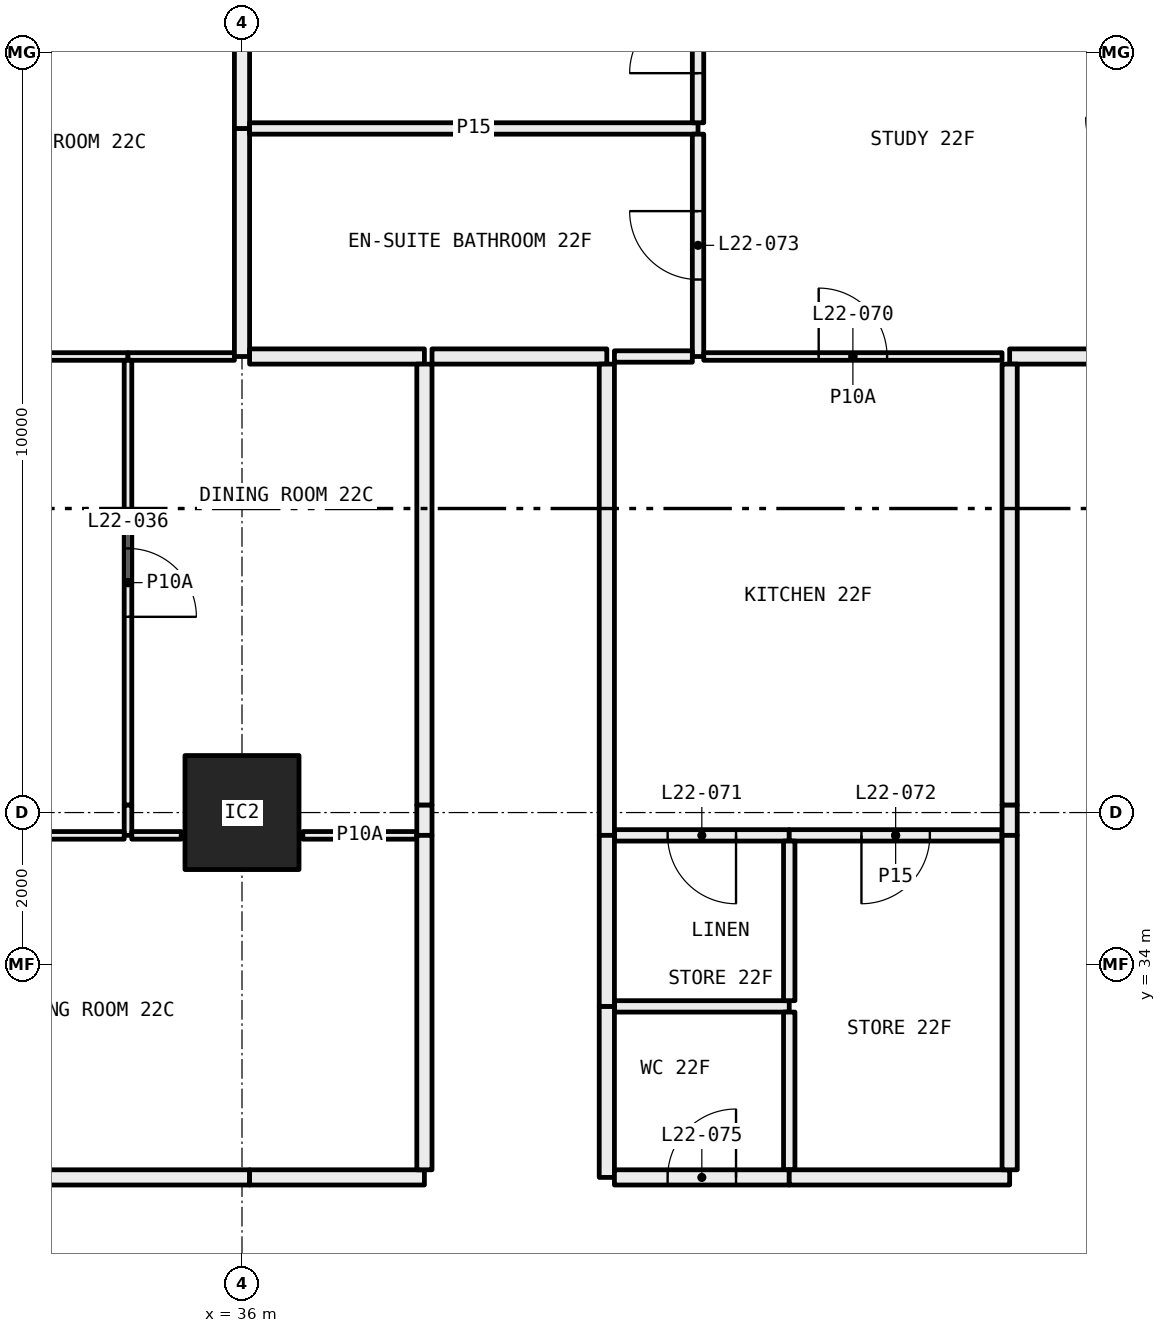
"""IFC4 building model, lengths in metres.
Left out: names, types, materials, properties, quantities, classifications, styles, units other than length and angle.
Written with IfcOpenShell. Run it as: python <this file> out.ifc"""

import sys

from ifc_helpers import new_model, si_unit, direction, frame, frame_2d, origin, origin_2d, place, context, subcontext, project, spatial, rectangle, hollow_rectangle, extrude, element, fill, save


model = new_model("IFC4")
c1 = context("Model", 3, precision=1e-05, world=origin(), true_north=direction((0.0, 1.0)))
c2 = subcontext(c1, "Body", "Model", "MODEL_VIEW")
j1 = project(units=[si_unit("LENGTHUNIT", "METRE"), si_unit("PLANEANGLEUNIT", "RADIAN")], contexts=[c1])
p1 = place(None, origin())
s1 = spatial("IfcSite", under=j1, at=p1, CompositionType="ELEMENT")
p2 = place(p1, origin())
s2 = spatial("IfcBuilding", under=s1, at=p2, CompositionType="ELEMENT")
p3 = place(p2, frame((0.0, 0.0, 88.65)))
s3 = spatial("IfcBuildingStorey", under=s2, at=p3, CompositionType="ELEMENT", Elevation=88.65)
p4 = place(p3, frame((36.0, 36.0, 0.0), z_axis=(0.0, 0.0, 1.0), x_axis=(1.0, 0.0, 0.0)))
e1 = element("IfcColumn", 1, at=p4, inside=s3, PredefinedType="COLUMN", context=c2, shape_type="SweptSolid", body=[
    extrude(hollow_rectangle(XDim=1.5, YDim=1.5, WallThickness=0.065, at=origin_2d()), origin(), (0.0, 0.0, 1.0), 3.05),
])
p5 = place(p3, frame((30.075, 42.0, 0.0), z_axis=(0.0, 0.0, 1.0), x_axis=(1.0, 0.0, 0.0)))
e2 = element("IfcWall", 2, at=p5, inside=s3, PredefinedType="PARTITIONING", context=c2, shape_type="SweptSolid", body=[
    extrude(rectangle(XDim=4.425, YDim=0.1, at=frame_2d((2.212, 0.0))), origin(), (0.0, 0.0, 1.0), 3.05),
])
p6 = place(p5, frame((1.762, 0.0, 0.0)))
e3 = element("IfcOpeningElement", 3, at=p6, cuts=e2, PredefinedType="OPENING", context=c2, shape_type="SweptSolid", body=[
    extrude(rectangle(XDim=0.9, YDim=2.1, at=frame_2d((0.45, 1.05))), frame((0.0, 0.06, 0.0), z_axis=(0.0, -1.0, 0.0), x_axis=(1.0, 0.0, 0.0)), (0.0, 0.0, 1.0), 0.12),
])
p7 = place(p3, frame((34.5, 42.0, 0.0), z_axis=(0.0, 0.0, 1.0), x_axis=(1.0, 0.0, 0.0)))
e4 = element("IfcWall", 4, at=p7, inside=s3, PredefinedType="PARTITIONING", context=c2, shape_type="SweptSolid", body=[
    extrude(rectangle(XDim=1.4, YDim=0.1, at=frame_2d((0.7, 0.0))), origin(), (0.0, 0.0, 1.0), 3.05),
])
p8 = place(p3, frame((36.0, 42.0, 0.0), z_axis=(0.0, 0.0, 1.0), x_axis=(0.0, 1.0, 0.0)))
e5 = element("IfcWall", 5, at=p8, inside=s3, PredefinedType="PARTITIONING", context=c2, shape_type="SweptSolid", body=[
    extrude(rectangle(XDim=3.0, YDim=0.2, at=frame_2d((1.5, 0.0))), origin(), (0.0, 0.0, 1.0), 2.45),
])
p9 = place(p3, frame((36.0, 45.0, 0.0), z_axis=(0.0, 0.0, 1.0), x_axis=(0.0, 1.0, 0.0)))
e6 = element("IfcWall", 6, at=p9, inside=s3, PredefinedType="PARTITIONING", context=c2, shape_type="SweptSolid", body=[
    extrude(rectangle(XDim=2.28, YDim=0.2, at=frame_2d((1.14, 0.0))), origin(), (0.0, 0.0, 1.0), 2.45),
])
p10 = place(p3, frame((34.5, 35.7, 0.0), z_axis=(0.0, 0.0, 1.0), x_axis=(0.0, 1.0, 0.0)))
e7 = element("IfcWall", 7, at=p10, inside=s3, PredefinedType="PARTITIONING", context=c2, shape_type="SweptSolid", body=[
    extrude(rectangle(XDim=0.4, YDim=0.1, at=frame_2d((0.2, 0.0))), origin(), (0.0, 0.0, 1.0), 2.45),
])
p11 = place(p3, frame((34.5, 36.1, 0.0), z_axis=(0.0, 0.0, 1.0), x_axis=(0.0, 1.0, 0.0)))
e8 = element("IfcWall", 8, at=p11, inside=s3, PredefinedType="PARTITIONING", context=c2, shape_type="SweptSolid", body=[
    extrude(rectangle(XDim=5.85, YDim=0.1, at=frame_2d((2.925, 0.0))), origin(), (0.0, 0.0, 1.0), 3.05),
])
p12 = place(p11, frame((2.475, 0.0, 0.0)))
e9 = element("IfcOpeningElement", 9, at=p12, cuts=e8, PredefinedType="OPENING", context=c2, shape_type="SweptSolid", body=[
    extrude(rectangle(XDim=0.9, YDim=2.1, at=frame_2d((0.45, 1.05))), frame((0.0, 0.06, 0.0), z_axis=(0.0, -1.0, 0.0), x_axis=(1.0, 0.0, 0.0)), (0.0, 0.0, 1.0), 0.12),
])
p13 = place(p3, frame((30.075, 35.7, 0.0), z_axis=(0.0, 0.0, 1.0), x_axis=(1.0, 0.0, 0.0)))
e10 = element("IfcWall", 10, at=p13, inside=s3, PredefinedType="PARTITIONING", context=c2, shape_type="SweptSolid", body=[
    extrude(rectangle(XDim=4.375, YDim=0.1, at=frame_2d((2.188, 0.0))), origin(), (0.0, 0.0, 1.0), 3.05),
])
p14 = place(p13, frame((1.738, 0.0, 0.0)))
e11 = element("IfcOpeningElement", 11, at=p14, cuts=e10, PredefinedType="OPENING", context=c2, shape_type="SweptSolid", body=[
    extrude(rectangle(XDim=0.9, YDim=2.1, at=frame_2d((0.45, 1.05))), frame((0.0, 0.06, 0.0), z_axis=(0.0, -1.0, 0.0), x_axis=(1.0, 0.0, 0.0)), (0.0, 0.0, 1.0), 0.12),
])
p15 = place(p3, frame((34.55, 35.7, 0.0), z_axis=(0.0, 0.0, 1.0), x_axis=(1.0, 0.0, 0.0)))
e12 = element("IfcWall", 12, at=p15, inside=s3, PredefinedType="PARTITIONING", context=c2, shape_type="SweptSolid", body=[
    extrude(rectangle(XDim=0.65, YDim=0.1, at=frame_2d((0.325, 0.0))), origin(), (0.0, 0.0, 1.0), 3.05),
])
p16 = place(p3, frame((36.8, 35.7, 0.0), z_axis=(0.0, 0.0, 1.0), x_axis=(1.0, 0.0, 0.0)))
e13 = element("IfcWall", 13, at=p16, inside=s3, PredefinedType="PARTITIONING", context=c2, shape_type="SweptSolid", body=[
    extrude(rectangle(XDim=1.5, YDim=0.1, at=frame_2d((0.75, 0.0))), origin(), (0.0, 0.0, 1.0), 3.05),
])
p17 = place(p3, frame((38.4, 42.0, 0.0), z_axis=(0.0, 0.0, 1.0), x_axis=(-1.0, 0.0, 0.0)))
e14 = element("IfcWall", 14, at=p17, inside=s3, PredefinedType="PARTITIONING", context=c2, shape_type="SweptSolid", body=[
    extrude(rectangle(XDim=2.3, YDim=0.2, at=frame_2d((1.15, 0.0))), origin(), (0.0, 0.0, 1.0), 3.05),
])
p18 = place(p3, frame((38.4, 35.7, 0.0), z_axis=(0.0, 0.0, 1.0), x_axis=(0.0, 1.0, 0.0)))
e15 = element("IfcWall", 15, at=p18, inside=s3, PredefinedType="PARTITIONING", context=c2, shape_type="SweptSolid", body=[
    extrude(rectangle(XDim=0.4, YDim=0.2, at=frame_2d((0.2, 0.0))), origin(), (0.0, 0.0, 1.0), 2.45),
])
p19 = place(p3, frame((38.4, 36.1, 0.0), z_axis=(0.0, 0.0, 1.0), x_axis=(0.0, 1.0, 0.0)))
e16 = element("IfcWall", 16, at=p19, inside=s3, PredefinedType="PARTITIONING", context=c2, shape_type="SweptSolid", body=[
    extrude(rectangle(XDim=5.8, YDim=0.2, at=frame_2d((2.9, 0.0))), origin(), (0.0, 0.0, 1.0), 3.05),
])
p20 = place(p3, frame((30.0, 31.2, 0.0), z_axis=(0.0, 0.0, 1.0), x_axis=(1.0, 0.0, 0.0)))
e17 = element("IfcWall", 17, at=p20, inside=s3, PredefinedType="PARTITIONING", context=c2, shape_type="SweptSolid", body=[
    extrude(rectangle(XDim=6.1, YDim=0.2, at=frame_2d((3.05, 0.0))), origin(), (0.0, 0.0, 1.0), 2.45),
])
p21 = place(p3, frame((36.1, 31.2, 0.0), z_axis=(0.0, 0.0, 1.0), x_axis=(1.0, 0.0, 0.0)))
e18 = element("IfcWall", 18, at=p21, inside=s3, PredefinedType="PARTITIONING", context=c2, shape_type="SweptSolid", body=[
    extrude(rectangle(XDim=2.3, YDim=0.2, at=frame_2d((1.15, 0.0))), origin(), (0.0, 0.0, 1.0), 3.05),
])
p22 = place(p3, frame((38.4, 31.3, 0.0), z_axis=(0.0, 0.0, 1.0), x_axis=(0.0, 1.0, 0.0)))
e19 = element("IfcWall", 19, at=p22, inside=s3, PredefinedType="PARTITIONING", context=c2, shape_type="SweptSolid", body=[
    extrude(rectangle(XDim=4.4, YDim=0.2, at=frame_2d((2.2, 0.0))), origin(), (0.0, 0.0, 1.0), 3.05),
])
p23 = place(p3, frame((42.0, 45.0, 0.0), z_axis=(0.0, 0.0, 1.0), x_axis=(-1.0, 0.0, 0.0)))
e20 = element("IfcWall", 20, at=p23, inside=s3, PredefinedType="PARTITIONING", context=c2, shape_type="SweptSolid", body=[
    extrude(rectangle(XDim=5.9, YDim=0.15, at=frame_2d((2.95, 0.0))), origin(), (0.0, 0.0, 1.0), 3.05),
])
p24 = place(p3, frame((42.0, 42.0, 0.0), z_axis=(0.0, 0.0, 1.0), x_axis=(0.0, 1.0, 0.0)))
e21 = element("IfcWall", 21, at=p24, inside=s3, PredefinedType="PARTITIONING", context=c2, shape_type="SweptSolid", body=[
    extrude(rectangle(XDim=2.925, YDim=0.15, at=frame_2d((1.462, 0.0))), origin(), (0.0, 0.0, 1.0), 3.05),
])
p25 = place(p24, frame((1.012, 0.0, 0.0)))
e22 = element("IfcOpeningElement", 22, at=p25, cuts=e21, PredefinedType="OPENING", context=c2, shape_type="SweptSolid", body=[
    extrude(rectangle(XDim=0.9, YDim=2.1, at=frame_2d((0.45, 1.05))), frame((0.0, 0.085, 0.0), z_axis=(0.0, -1.0, 0.0), x_axis=(1.0, 0.0, 0.0)), (0.0, 0.0, 1.0), 0.17),
])
p26 = place(p3, frame((40.9, 42.0, 0.0), z_axis=(0.0, 0.0, 1.0), x_axis=(1.0, 0.0, 0.0)))
e23 = element("IfcWall", 23, at=p26, inside=s3, PredefinedType="PARTITIONING", context=c2, shape_type="SweptSolid", body=[
    extrude(rectangle(XDim=1.025, YDim=0.15, at=frame_2d((0.513, 0.0))), origin(), (0.0, 0.0, 1.0), 3.05),
])
p27 = place(p3, frame((38.5, 42.0, 0.0), z_axis=(0.0, 0.0, 1.0), x_axis=(1.0, 0.0, 0.0)))
e24 = element("IfcWall", 24, at=p27, inside=s3, PredefinedType="PARTITIONING", context=c2, shape_type="SweptSolid", body=[
    extrude(rectangle(XDim=2.3, YDim=0.2, at=frame_2d((1.15, 0.0))), origin(), (0.0, 0.0, 1.0), 3.05),
])
p28 = place(p3, frame((42.0, 45.075, 0.0), z_axis=(0.0, 0.0, 1.0), x_axis=(0.0, 1.0, 0.0)))
e25 = element("IfcWall", 25, at=p28, inside=s3, PredefinedType="PARTITIONING", context=c2, shape_type="SweptSolid", body=[
    extrude(rectangle(XDim=2.205, YDim=0.15, at=frame_2d((1.103, 0.0))), origin(), (0.0, 0.0, 1.0), 3.05),
])
p29 = place(p28, frame((0.653, 0.0, 0.0)))
e26 = element("IfcOpeningElement", 26, at=p29, cuts=e25, PredefinedType="OPENING", context=c2, shape_type="SweptSolid", body=[
    extrude(rectangle(XDim=0.9, YDim=2.1, at=frame_2d((0.45, 1.05))), frame((0.0, 0.085, 0.0), z_axis=(0.0, -1.0, 0.0), x_axis=(1.0, 0.0, 0.0)), (0.0, 0.0, 1.0), 0.17),
])
p30 = place(p3, frame((42.075, 42.0, 0.0), z_axis=(0.0, 0.0, 1.0), x_axis=(1.0, 0.0, 0.0)))
e27 = element("IfcWall", 27, at=p30, inside=s3, PredefinedType="PARTITIONING", context=c2, shape_type="SweptSolid", body=[
    extrude(rectangle(XDim=3.925, YDim=0.1, at=frame_2d((1.962, 0.0))), origin(), (0.0, 0.0, 1.0), 3.05),
])
p31 = place(p30, frame((1.512, 0.0, 0.0)))
e28 = element("IfcOpeningElement", 28, at=p31, cuts=e27, PredefinedType="OPENING", context=c2, shape_type="SweptSolid", body=[
    extrude(rectangle(XDim=0.9, YDim=2.1, at=frame_2d((0.45, 1.05))), frame((0.0, 0.06, 0.0), z_axis=(0.0, -1.0, 0.0), x_axis=(1.0, 0.0, 0.0)), (0.0, 0.0, 1.0), 0.12),
])
p32 = place(p3, frame((46.1, 42.0, 0.0), z_axis=(0.0, 0.0, 1.0), x_axis=(1.0, 0.0, 0.0)))
e29 = element("IfcWall", 29, at=p32, inside=s3, PredefinedType="PARTITIONING", context=c2, shape_type="SweptSolid", body=[
    extrude(rectangle(XDim=1.9, YDim=0.2, at=frame_2d((0.95, 0.0))), origin(), (0.0, 0.0, 1.0), 3.05),
])
p33 = place(p3, frame((40.9, 35.7, 0.0), z_axis=(0.0, 0.0, 1.0), x_axis=(1.0, 0.0, 0.0)))
e30 = element("IfcWall", 30, at=p33, inside=s3, PredefinedType="PARTITIONING", context=c2, shape_type="SweptSolid", body=[
    extrude(rectangle(XDim=2.3, YDim=0.15, at=frame_2d((1.15, 0.0))), origin(), (0.0, 0.0, 1.0), 3.05),
])
p34 = place(p33, frame((0.7, 0.0, 0.0)))
e31 = element("IfcOpeningElement", 31, at=p34, cuts=e30, PredefinedType="OPENING", context=c2, shape_type="SweptSolid", body=[
    extrude(rectangle(XDim=0.9, YDim=2.1, at=frame_2d((0.45, 1.05))), frame((0.0, 0.085, 0.0), z_axis=(0.0, -1.0, 0.0), x_axis=(1.0, 0.0, 0.0)), (0.0, 0.0, 1.0), 0.17),
])
p35 = place(p3, frame((43.2, 35.7, 0.0), z_axis=(0.0, 0.0, 1.0), x_axis=(1.0, 0.0, 0.0)))
e32 = element("IfcWall", 32, at=p35, inside=s3, PredefinedType="PARTITIONING", context=c2, shape_type="SweptSolid", body=[
    extrude(rectangle(XDim=2.8, YDim=0.15, at=frame_2d((1.4, 0.0))), origin(), (0.0, 0.0, 1.0), 3.05),
])
p36 = place(p35, frame((0.95, 0.0, 0.0)))
e33 = element("IfcOpeningElement", 33, at=p36, cuts=e32, PredefinedType="OPENING", context=c2, shape_type="SweptSolid", body=[
    extrude(rectangle(XDim=0.9, YDim=2.1, at=frame_2d((0.45, 1.05))), frame((0.0, 0.085, 0.0), z_axis=(0.0, -1.0, 0.0), x_axis=(1.0, 0.0, 0.0)), (0.0, 0.0, 1.0), 0.17),
])
p37 = place(p3, frame((40.8, 41.9, 0.0), z_axis=(0.0, 0.0, 1.0), x_axis=(0.0, -1.0, 0.0)))
e34 = element("IfcWall", 34, at=p37, inside=s3, PredefinedType="PARTITIONING", context=c2, shape_type="SweptSolid", body=[
    extrude(rectangle(XDim=6.2, YDim=0.2, at=frame_2d((3.1, 0.0))), origin(), (0.0, 0.0, 1.0), 2.45),
])
p38 = place(p3, frame((46.1, 35.7, 0.0), z_axis=(0.0, 0.0, 1.0), x_axis=(0.0, 1.0, 0.0)))
e35 = element("IfcWall", 35, at=p38, inside=s3, PredefinedType="PARTITIONING", context=c2, shape_type="SweptSolid", body=[
    extrude(rectangle(XDim=0.4, YDim=0.2, at=frame_2d((0.2, 0.0))), origin(), (0.0, 0.0, 1.0), 2.45),
])
p39 = place(p3, frame((46.1, 36.1, 0.0), z_axis=(0.0, 0.0, 1.0), x_axis=(0.0, 1.0, 0.0)))
e36 = element("IfcWall", 36, at=p39, inside=s3, PredefinedType="PARTITIONING", context=c2, shape_type="SweptSolid", body=[
    extrude(rectangle(XDim=5.8, YDim=0.2, at=frame_2d((2.9, 0.0))), origin(), (0.0, 0.0, 1.0), 3.05),
])
p40 = place(p3, frame((43.2, 33.45, 0.0), z_axis=(0.0, 0.0, 1.0), x_axis=(-1.0, 0.0, 0.0)))
e37 = element("IfcWall", 37, at=p40, inside=s3, PredefinedType="PARTITIONING", context=c2, shape_type="SweptSolid", body=[
    extrude(rectangle(XDim=2.3, YDim=0.15, at=frame_2d((1.15, 0.0))), origin(), (0.0, 0.0, 1.0), 3.05),
])
p41 = place(p3, frame((43.2, 31.3, 0.0), z_axis=(0.0, 0.0, 1.0), x_axis=(0.0, 1.0, 0.0)))
e38 = element("IfcWall", 38, at=p41, inside=s3, PredefinedType="PARTITIONING", context=c2, shape_type="SweptSolid", body=[
    extrude(rectangle(XDim=2.075, YDim=0.15, at=frame_2d((1.038, 0.0))), origin(), (0.0, 0.0, 1.0), 3.05),
])
p42 = place(p3, frame((40.8, 33.45, 0.0), z_axis=(0.0, 0.0, 1.0), x_axis=(0.0, -1.0, 0.0)))
e39 = element("IfcWall", 39, at=p42, inside=s3, PredefinedType="PARTITIONING", context=c2, shape_type="SweptSolid", body=[
    extrude(rectangle(XDim=2.25, YDim=0.2, at=frame_2d((1.125, 0.0))), origin(), (0.0, 0.0, 1.0), 3.05),
])
p43 = place(p3, frame((40.9, 31.2, 0.0), z_axis=(0.0, 0.0, 1.0), x_axis=(1.0, 0.0, 0.0)))
e40 = element("IfcWall", 40, at=p43, inside=s3, PredefinedType="PARTITIONING", context=c2, shape_type="SweptSolid", body=[
    extrude(rectangle(XDim=2.3, YDim=0.2, at=frame_2d((1.15, 0.0))), origin(), (0.0, 0.0, 1.0), 3.05),
])
p44 = place(p43, frame((0.7, 0.0, 0.0)))
e41 = element("IfcOpeningElement", 41, at=p44, cuts=e40, PredefinedType="OPENING", context=c2, shape_type="SweptSolid", body=[
    extrude(rectangle(XDim=0.9, YDim=2.1, at=frame_2d((0.45, 1.05))), frame((0.0, 0.11, 0.0), z_axis=(0.0, -1.0, 0.0), x_axis=(1.0, 0.0, 0.0)), (0.0, 0.0, 1.0), 0.22),
])
p45 = place(p3, frame((43.2, 33.525, 0.0), z_axis=(0.0, 0.0, 1.0), x_axis=(0.0, 1.0, 0.0)))
e42 = element("IfcWall", 42, at=p45, inside=s3, PredefinedType="PARTITIONING", context=c2, shape_type="SweptSolid", body=[
    extrude(rectangle(XDim=2.1, YDim=0.15, at=frame_2d((1.05, 0.0))), origin(), (0.0, 0.0, 1.0), 3.05),
])
p46 = place(p3, frame((40.8, 35.7, 0.0), z_axis=(0.0, 0.0, 1.0), x_axis=(0.0, -1.0, 0.0)))
e43 = element("IfcWall", 43, at=p46, inside=s3, PredefinedType="PARTITIONING", context=c2, shape_type="SweptSolid", body=[
    extrude(rectangle(XDim=2.25, YDim=0.2, at=frame_2d((1.125, 0.0))), origin(), (0.0, 0.0, 1.0), 3.05),
])
p47 = place(p3, frame((43.2, 31.2, 0.0), z_axis=(0.0, 0.0, 1.0), x_axis=(1.0, 0.0, 0.0)))
e44 = element("IfcWall", 44, at=p47, inside=s3, PredefinedType="PARTITIONING", context=c2, shape_type="SweptSolid", body=[
    extrude(rectangle(XDim=2.9, YDim=0.2, at=frame_2d((1.45, 0.0))), origin(), (0.0, 0.0, 1.0), 3.05),
])
p48 = place(p3, frame((46.1, 31.3, 0.0), z_axis=(0.0, 0.0, 1.0), x_axis=(0.0, 1.0, 0.0)))
e45 = element("IfcWall", 45, at=p48, inside=s3, PredefinedType="PARTITIONING", context=c2, shape_type="SweptSolid", body=[
    extrude(rectangle(XDim=4.4, YDim=0.2, at=frame_2d((2.2, 0.0))), origin(), (0.0, 0.0, 1.0), 3.05),
])
p49 = place(p12, frame((0.9, 0.0, 0.0), x_axis=(-1.0, 0.0, 0.0)))
e46 = element("IfcDoor", 46, at=p49, inside=s3, OperationType="SINGLE_SWING_LEFT", PredefinedType="DOOR", context=c2, shape_type="SweptSolid", body=[
    extrude(rectangle(XDim=0.9, YDim=2.1, at=frame_2d((0.45, 1.05))), frame((0.0, 0.025, 0.0), z_axis=(0.0, -1.0, 0.0), x_axis=(1.0, 0.0, 0.0)), (0.0, 0.0, 1.0), 0.05),
])
fill(e9, e46)
p50 = place(p31, origin())
e47 = element("IfcDoor", 47, at=p50, inside=s3, OperationType="SINGLE_SWING_RIGHT", PredefinedType="DOOR", context=c2, shape_type="SweptSolid", body=[
    extrude(rectangle(XDim=0.9, YDim=2.1, at=frame_2d((0.45, 1.05))), frame((0.0, 0.025, 0.0), z_axis=(0.0, -1.0, 0.0), x_axis=(1.0, 0.0, 0.0)), (0.0, 0.0, 1.0), 0.05),
])
fill(e28, e47)
p51 = place(p34, frame((0.9, 0.0, 0.0), x_axis=(-1.0, 0.0, 0.0)))
e48 = element("IfcDoor", 48, at=p51, inside=s3, OperationType="SINGLE_SWING_RIGHT", PredefinedType="DOOR", context=c2, shape_type="SweptSolid", body=[
    extrude(rectangle(XDim=0.9, YDim=2.1, at=frame_2d((0.45, 1.05))), frame((0.0, 0.025, 0.0), z_axis=(0.0, -1.0, 0.0), x_axis=(1.0, 0.0, 0.0)), (0.0, 0.0, 1.0), 0.05),
])
fill(e31, e48)
p52 = place(p36, frame((0.9, 0.0, 0.0), x_axis=(-1.0, 0.0, 0.0)))
e49 = element("IfcDoor", 49, at=p52, inside=s3, OperationType="SINGLE_SWING_LEFT", PredefinedType="DOOR", context=c2, shape_type="SweptSolid", body=[
    extrude(rectangle(XDim=0.9, YDim=2.1, at=frame_2d((0.45, 1.05))), frame((0.0, 0.025, 0.0), z_axis=(0.0, -1.0, 0.0), x_axis=(1.0, 0.0, 0.0)), (0.0, 0.0, 1.0), 0.05),
])
fill(e33, e49)
p53 = place(p25, origin())
e50 = element("IfcDoor", 50, at=p53, inside=s3, OperationType="SINGLE_SWING_LEFT", PredefinedType="DOOR", context=c2, shape_type="SweptSolid", body=[
    extrude(rectangle(XDim=0.9, YDim=2.1, at=frame_2d((0.45, 1.05))), frame((0.0, 0.025, 0.0), z_axis=(0.0, -1.0, 0.0), x_axis=(1.0, 0.0, 0.0)), (0.0, 0.0, 1.0), 0.05),
])
fill(e22, e50)
p54 = place(p29, origin())
e51 = element("IfcDoor", 51, at=p54, inside=s3, OperationType="SINGLE_SWING_RIGHT", PredefinedType="DOOR", context=c2, shape_type="SweptSolid", body=[
    extrude(rectangle(XDim=0.9, YDim=2.1, at=frame_2d((0.45, 1.05))), frame((0.0, 0.025, 0.0), z_axis=(0.0, -1.0, 0.0), x_axis=(1.0, 0.0, 0.0)), (0.0, 0.0, 1.0), 0.05),
])
fill(e26, e51)
p55 = place(p44, origin())
e52 = element("IfcDoor", 52, at=p55, inside=s3, OperationType="SINGLE_SWING_LEFT", PredefinedType="DOOR", context=c2, shape_type="SweptSolid", body=[
    extrude(rectangle(XDim=0.9, YDim=2.1, at=frame_2d((0.45, 1.05))), frame((0.0, 0.025, 0.0), z_axis=(0.0, -1.0, 0.0), x_axis=(1.0, 0.0, 0.0)), (0.0, 0.0, 1.0), 0.05),
])
fill(e41, e52)
save(model, sys.argv[1])
